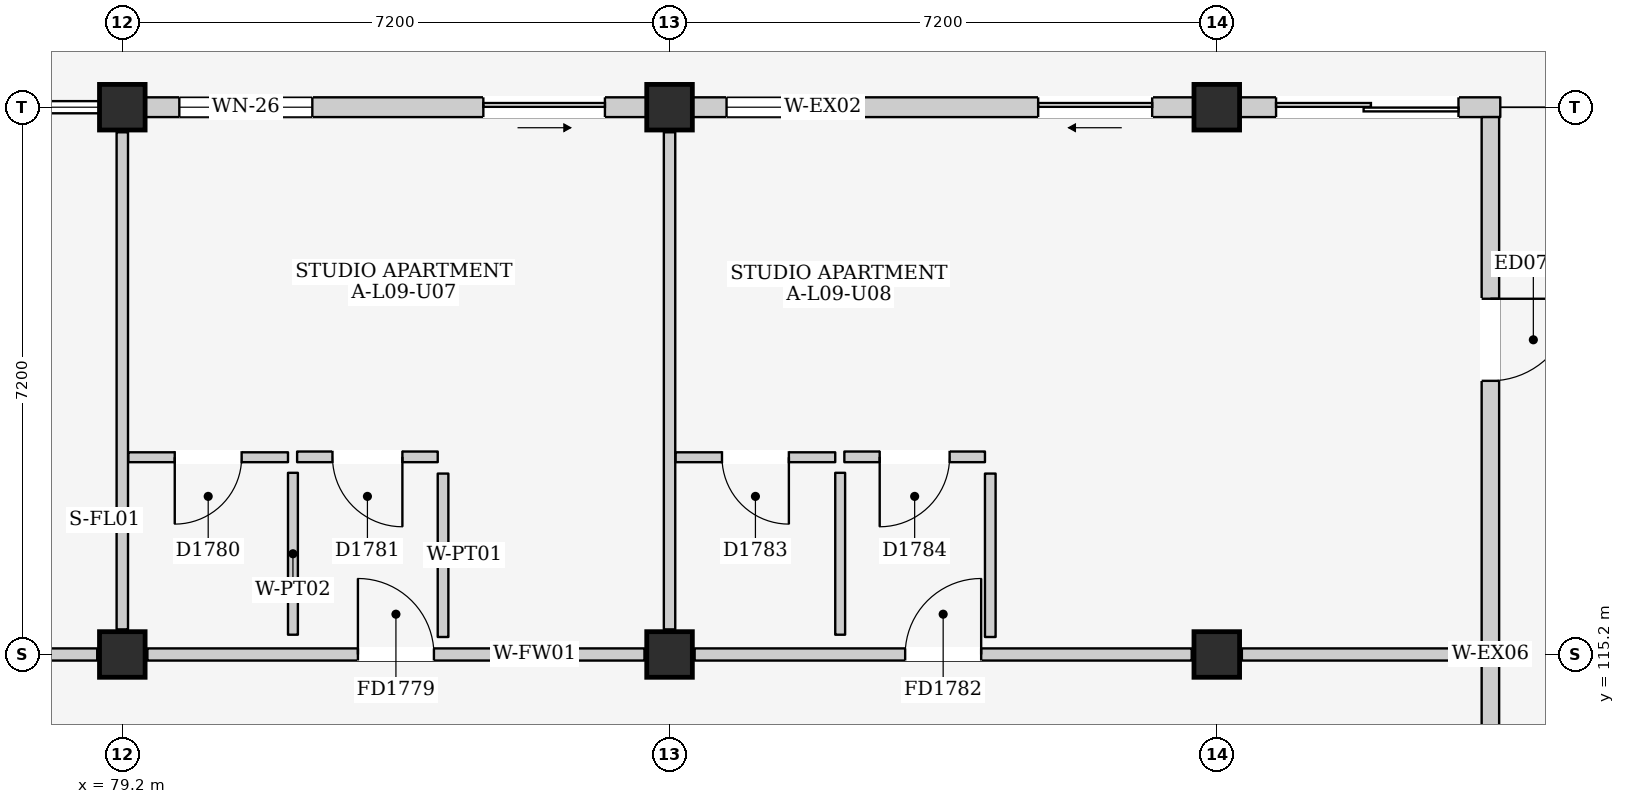
"""IFC4 building model, lengths in metres.
Left out: names, types, materials, properties, quantities, classifications, styles, units other than length and angle.
Written with IfcOpenShell. Run it as: python <this file> out.ifc"""

import sys

from ifc_helpers import new_model, si_unit, direction, frame, frame_2d, origin, origin_2d, place, context, subcontext, project, spatial, rectangle, extrude, element, fill, save


model = new_model("IFC4")
c1 = context("Model", 3, precision=1e-05, world=origin(), true_north=direction((0.0, 1.0)))
c2 = subcontext(c1, "Body", "Model", "MODEL_VIEW")
j1 = project(units=[si_unit("LENGTHUNIT", "METRE"), si_unit("PLANEANGLEUNIT", "RADIAN")], contexts=[c1])
p1 = place(None, origin())
s1 = spatial("IfcSite", under=j1, at=p1, CompositionType="ELEMENT")
p2 = place(p1, origin())
s2 = spatial("IfcBuilding", under=s1, at=p2, CompositionType="ELEMENT")
p3 = place(p2, frame((0.0, 0.0, 31.5)))
s3 = spatial("IfcBuildingStorey", under=s2, at=p3, CompositionType="ELEMENT", Elevation=31.5)
for number, where, z_axis, x_axis in (
    (1, (79.2, 115.2, 0.0), (0.0, 0.0, 1.0), (1.0, 0.0, 0.0)),
    (2, (79.2, 122.4, 0.0), (0.0, 0.0, 1.0), (1.0, 0.0, 0.0)),
    (3, (86.4, 115.2, 0.0), (0.0, 0.0, 1.0), (1.0, 0.0, 0.0)),
    (4, (86.4, 122.4, 0.0), (0.0, 0.0, 1.0), (1.0, 0.0, 0.0)),
    (5, (93.6, 115.2, 0.0), (0.0, 0.0, 1.0), (1.0, 0.0, 0.0)),
    (6, (93.6, 122.4, 0.0), (0.0, 0.0, 1.0), (1.0, 0.0, 0.0)),
):
    element("IfcColumn", number, at=place(p3, frame(where, z_axis=z_axis, x_axis=x_axis)), inside=s3, PredefinedType="COLUMN", context=c2, shape_type="SweptSolid", body=[
        extrude(rectangle(XDim=0.6, YDim=0.6, at=origin_2d()), origin(), (0.0, 0.0, 1.0), 3.3),
    ])
p4 = place(p3, frame((79.5, 122.4, 0.0), z_axis=(0.0, 0.0, 1.0), x_axis=(1.0, 0.0, 0.0)))
e7 = element("IfcWall", 7, at=p4, inside=s3, PredefinedType="ELEMENTEDWALL", context=c2, shape_type="SweptSolid", body=[
    extrude(rectangle(XDim=6.6, YDim=0.26, at=frame_2d((3.3, 0.0))), origin(), (0.0, 0.0, 1.0), 2.615),
])
p5 = place(p4, frame((4.45, 0.0, 0.0)))
e8 = element("IfcOpeningElement", 8, at=p5, cuts=e7, PredefinedType="OPENING", context=c2, shape_type="SweptSolid", body=[
    extrude(rectangle(XDim=1.6, YDim=2.12, at=frame_2d((0.8, 1.06))), frame((0.0, 0.145, 0.0), z_axis=(0.0, -1.0, 0.0), x_axis=(1.0, 0.0, 0.0)), (0.0, 0.0, 1.0), 0.29),
])
p6 = place(p4, frame((0.45, 0.0, 0.9)))
e9 = element("IfcOpeningElement", 9, at=p6, cuts=e7, PredefinedType="OPENING", context=c2, shape_type="SweptSolid", body=[
    extrude(rectangle(XDim=1.75, YDim=1.55, at=frame_2d((0.875, 0.775))), frame((0.0, 0.145, 0.0), z_axis=(0.0, -1.0, 0.0), x_axis=(1.0, 0.0, 0.0)), (0.0, 0.0, 1.0), 0.29),
])
p7 = place(p3, frame((86.7, 122.4, 0.0), z_axis=(0.0, 0.0, 1.0), x_axis=(1.0, 0.0, 0.0)))
e10 = element("IfcWall", 10, at=p7, inside=s3, PredefinedType="ELEMENTEDWALL", context=c2, shape_type="SweptSolid", body=[
    extrude(rectangle(XDim=6.6, YDim=0.26, at=frame_2d((3.3, 0.0))), origin(), (0.0, 0.0, 1.0), 2.615),
])
p8 = place(p7, frame((4.55, 0.0, 0.0)))
e11 = element("IfcOpeningElement", 11, at=p8, cuts=e10, PredefinedType="OPENING", context=c2, shape_type="SweptSolid", body=[
    extrude(rectangle(XDim=1.5, YDim=2.12, at=frame_2d((0.75, 1.06))), frame((0.0, 0.145, 0.0), z_axis=(0.0, -1.0, 0.0), x_axis=(1.0, 0.0, 0.0)), (0.0, 0.0, 1.0), 0.29),
])
p9 = place(p7, frame((0.45, 0.0, 0.9)))
e12 = element("IfcOpeningElement", 12, at=p9, cuts=e10, PredefinedType="OPENING", context=c2, shape_type="SweptSolid", body=[
    extrude(rectangle(XDim=1.8, YDim=1.5, at=frame_2d((0.9, 0.75))), frame((0.0, 0.145, 0.0), z_axis=(0.0, -1.0, 0.0), x_axis=(1.0, 0.0, 0.0)), (0.0, 0.0, 1.0), 0.29),
])
p10 = place(p3, frame((93.9, 122.4, 0.0), z_axis=(0.0, 0.0, 1.0), x_axis=(1.0, 0.0, 0.0)))
e13 = element("IfcWall", 13, at=p10, inside=s3, PredefinedType="ELEMENTEDWALL", context=c2, shape_type="SweptSolid", body=[
    extrude(rectangle(XDim=3.43, YDim=0.26, at=frame_2d((1.715, 0.0))), origin(), (0.0, 0.0, 1.0), 2.415),
])
p11 = place(p10, frame((0.48, 0.0, 0.0)))
e14 = element("IfcOpeningElement", 14, at=p11, cuts=e13, PredefinedType="OPENING", context=c2, shape_type="SweptSolid", body=[
    extrude(rectangle(XDim=2.4, YDim=2.12, at=frame_2d((1.2, 1.06))), frame((0.0, 0.145, 0.0), z_axis=(0.0, -1.0, 0.0), x_axis=(1.0, 0.0, 0.0)), (0.0, 0.0, 1.0), 0.29),
])
p12 = place(p3, frame((97.2, 108.13, 0.0), z_axis=(0.0, 0.0, 1.0), x_axis=(0.0, 1.0, 0.0)))
e15 = element("IfcWall", 15, at=p12, inside=s3, PredefinedType="ELEMENTEDWALL", context=c2, shape_type="SweptSolid", body=[
    extrude(rectangle(XDim=7.07, YDim=0.23, at=frame_2d((3.535, 0.0))), origin(), (0.0, 0.0, 1.0), 2.515),
])
p13 = place(p12, frame((2.75, 0.0, 1.1)))
e16 = element("IfcOpeningElement", 16, at=p13, cuts=e15, PredefinedType="OPENING", context=c2, shape_type="SweptSolid", body=[
    extrude(rectangle(XDim=1.0, YDim=0.9, at=frame_2d((0.5, 0.45))), frame((0.0, 0.13, 0.0), z_axis=(0.0, -1.0, 0.0), x_axis=(1.0, 0.0, 0.0)), (0.0, 0.0, 1.0), 0.26),
])
p14 = place(p3, frame((97.2, 115.2, 0.0), z_axis=(0.0, 0.0, 1.0), x_axis=(0.0, 1.0, 0.0)))
e17 = element("IfcWall", 17, at=p14, inside=s3, PredefinedType="ELEMENTEDWALL", context=c2, shape_type="SweptSolid", body=[
    extrude(rectangle(XDim=7.07, YDim=0.23, at=frame_2d((3.535, 0.0))), origin(), (0.0, 0.0, 1.0), 2.515),
])
p15 = place(p14, frame((3.6, 0.0, 0.0)))
e18 = element("IfcOpeningElement", 18, at=p15, cuts=e17, PredefinedType="OPENING", context=c2, shape_type="SweptSolid", body=[
    extrude(rectangle(XDim=1.08, YDim=2.12, at=frame_2d((0.54, 1.06))), frame((0.0, 0.13, 0.0), z_axis=(0.0, -1.0, 0.0), x_axis=(1.0, 0.0, 0.0)), (0.0, 0.0, 1.0), 0.26),
])
p16 = place(p3, frame((72.33, 115.2, 0.0), z_axis=(0.0, 0.0, 1.0), x_axis=(1.0, 0.0, 0.0)))
e19 = element("IfcWall", 19, at=p16, inside=s3, PredefinedType="PARTITIONING", context=c2, shape_type="SweptSolid", body=[
    extrude(rectangle(XDim=6.54, YDim=0.16, at=frame_2d((3.27, 0.0))), origin(), (0.0, 0.0, 1.0), 2.415),
])
p17 = place(p16, frame((2.77, 0.0, 0.0)))
e20 = element("IfcOpeningElement", 20, at=p17, cuts=e19, PredefinedType="OPENING", context=c2, shape_type="SweptSolid", body=[
    extrude(rectangle(XDim=1.0, YDim=2.15, at=frame_2d((0.5, 1.075))), frame((0.0, 0.095, 0.0), z_axis=(0.0, -1.0, 0.0), x_axis=(1.0, 0.0, 0.0)), (0.0, 0.0, 1.0), 0.19),
])
p18 = place(p3, frame((79.2, 115.53, 0.0), z_axis=(0.0, 0.0, 1.0), x_axis=(0.0, 1.0, 0.0)))
e21 = element("IfcWall", 21, at=p18, inside=s3, PredefinedType="PARTITIONING", context=c2, shape_type="SweptSolid", body=[
    extrude(rectangle(XDim=6.54, YDim=0.15, at=frame_2d((3.27, 0.0))), origin(), (0.0, 0.0, 1.0), 2.565),
])
p19 = place(p3, frame((79.53, 115.2, 0.0), z_axis=(0.0, 0.0, 1.0), x_axis=(1.0, 0.0, 0.0)))
e22 = element("IfcWall", 22, at=p19, inside=s3, PredefinedType="PARTITIONING", context=c2, shape_type="SweptSolid", body=[
    extrude(rectangle(XDim=6.54, YDim=0.16, at=frame_2d((3.27, 0.0))), origin(), (0.0, 0.0, 1.0), 2.415),
])
p20 = place(p19, frame((2.77, 0.0, 0.0)))
e23 = element("IfcOpeningElement", 23, at=p20, cuts=e22, PredefinedType="OPENING", context=c2, shape_type="SweptSolid", body=[
    extrude(rectangle(XDim=1.0, YDim=2.15, at=frame_2d((0.5, 1.075))), frame((0.0, 0.095, 0.0), z_axis=(0.0, -1.0, 0.0), x_axis=(1.0, 0.0, 0.0)), (0.0, 0.0, 1.0), 0.19),
])
p21 = place(p3, frame((86.4, 115.53, 0.0), z_axis=(0.0, 0.0, 1.0), x_axis=(0.0, 1.0, 0.0)))
e24 = element("IfcWall", 24, at=p21, inside=s3, PredefinedType="PARTITIONING", context=c2, shape_type="SweptSolid", body=[
    extrude(rectangle(XDim=6.54, YDim=0.15, at=frame_2d((3.27, 0.0))), origin(), (0.0, 0.0, 1.0), 2.565),
])
p22 = place(p3, frame((79.28, 117.795, 0.0), z_axis=(0.0, 0.0, 1.0), x_axis=(1.0, 0.0, 0.0)))
e25 = element("IfcWall", 25, at=p22, inside=s3, PredefinedType="PARTITIONING", context=c2, shape_type="SweptSolid", body=[
    extrude(rectangle(XDim=2.1, YDim=0.13, at=frame_2d((1.05, 0.0))), origin(), (0.0, 0.0, 1.0), 3.08),
])
p23 = place(p22, frame((0.61, 0.0, 0.0)))
e26 = element("IfcOpeningElement", 26, at=p23, cuts=e25, PredefinedType="OPENING", context=c2, shape_type="SweptSolid", body=[
    extrude(rectangle(XDim=0.88, YDim=2.1, at=frame_2d((0.44, 1.05))), frame((0.0, 0.08, 0.0), z_axis=(0.0, -1.0, 0.0), x_axis=(1.0, 0.0, 0.0)), (0.0, 0.0, 1.0), 0.16),
])
p24 = place(p3, frame((81.445, 115.46, 0.0), z_axis=(0.0, 0.0, 1.0), x_axis=(0.0, 1.0, 0.0)))
e27 = element("IfcWall", 27, at=p24, inside=s3, PredefinedType="PARTITIONING", context=c2, shape_type="SweptSolid", body=[
    extrude(rectangle(XDim=2.13, YDim=0.13, at=frame_2d((1.065, 0.0))), origin(), (0.0, 0.0, 1.0), 3.08),
])
p25 = place(p3, frame((81.5, 117.8, 0.0), z_axis=(0.0, 0.0, 1.0), x_axis=(1.0, 0.0, 0.0)))
e28 = element("IfcWall", 28, at=p25, inside=s3, PredefinedType="PARTITIONING", context=c2, shape_type="SweptSolid", body=[
    extrude(rectangle(XDim=1.85, YDim=0.14, at=frame_2d((0.925, 0.0))), origin(), (0.0, 0.0, 1.0), 3.08),
])
p26 = place(p25, frame((0.465, 0.0, 0.0)))
e29 = element("IfcOpeningElement", 29, at=p26, cuts=e28, PredefinedType="OPENING", context=c2, shape_type="SweptSolid", body=[
    extrude(rectangle(XDim=0.92, YDim=2.1, at=frame_2d((0.46, 1.05))), frame((0.0, 0.085, 0.0), z_axis=(0.0, -1.0, 0.0), x_axis=(1.0, 0.0, 0.0)), (0.0, 0.0, 1.0), 0.17),
])
p27 = place(p3, frame((83.42, 115.43, 0.0), z_axis=(0.0, 0.0, 1.0), x_axis=(0.0, 1.0, 0.0)))
e30 = element("IfcWall", 30, at=p27, inside=s3, PredefinedType="PARTITIONING", context=c2, shape_type="SweptSolid", body=[
    extrude(rectangle(XDim=2.15, YDim=0.14, at=frame_2d((1.075, 0.0))), origin(), (0.0, 0.0, 1.0), 3.08),
])
p28 = place(p3, frame((86.73, 115.2, 0.0), z_axis=(0.0, 0.0, 1.0), x_axis=(1.0, 0.0, 0.0)))
e31 = element("IfcWall", 31, at=p28, inside=s3, PredefinedType="PARTITIONING", context=c2, shape_type="SweptSolid", body=[
    extrude(rectangle(XDim=6.54, YDim=0.16, at=frame_2d((3.27, 0.0))), origin(), (0.0, 0.0, 1.0), 2.415),
])
p29 = place(p28, frame((2.77, 0.0, 0.0)))
e32 = element("IfcOpeningElement", 32, at=p29, cuts=e31, PredefinedType="OPENING", context=c2, shape_type="SweptSolid", body=[
    extrude(rectangle(XDim=1.0, YDim=2.15, at=frame_2d((0.5, 1.075))), frame((0.0, 0.095, 0.0), z_axis=(0.0, -1.0, 0.0), x_axis=(1.0, 0.0, 0.0)), (0.0, 0.0, 1.0), 0.19),
])
p30 = place(p3, frame((93.93, 115.2, 0.0), z_axis=(0.0, 0.0, 1.0), x_axis=(1.0, 0.0, 0.0)))
e33 = element("IfcWall", 33, at=p30, inside=s3, PredefinedType="PARTITIONING", context=c2, shape_type="SweptSolid", body=[
    extrude(rectangle(XDim=2.99, YDim=0.16, at=frame_2d((1.495, 0.0))), origin(), (0.0, 0.0, 1.0), 2.415),
])
p31 = place(p3, frame((86.48, 117.795, 0.0), z_axis=(0.0, 0.0, 1.0), x_axis=(1.0, 0.0, 0.0)))
e34 = element("IfcWall", 34, at=p31, inside=s3, PredefinedType="PARTITIONING", context=c2, shape_type="SweptSolid", body=[
    extrude(rectangle(XDim=2.1, YDim=0.13, at=frame_2d((1.05, 0.0))), origin(), (0.0, 0.0, 1.0), 3.08),
])
p32 = place(p31, frame((0.61, 0.0, 0.0)))
e35 = element("IfcOpeningElement", 35, at=p32, cuts=e34, PredefinedType="OPENING", context=c2, shape_type="SweptSolid", body=[
    extrude(rectangle(XDim=0.88, YDim=2.1, at=frame_2d((0.44, 1.05))), frame((0.0, 0.08, 0.0), z_axis=(0.0, -1.0, 0.0), x_axis=(1.0, 0.0, 0.0)), (0.0, 0.0, 1.0), 0.16),
])
p33 = place(p3, frame((88.645, 115.46, 0.0), z_axis=(0.0, 0.0, 1.0), x_axis=(0.0, 1.0, 0.0)))
e36 = element("IfcWall", 36, at=p33, inside=s3, PredefinedType="PARTITIONING", context=c2, shape_type="SweptSolid", body=[
    extrude(rectangle(XDim=2.13, YDim=0.13, at=frame_2d((1.065, 0.0))), origin(), (0.0, 0.0, 1.0), 3.08),
])
p34 = place(p3, frame((88.7, 117.8, 0.0), z_axis=(0.0, 0.0, 1.0), x_axis=(1.0, 0.0, 0.0)))
e37 = element("IfcWall", 37, at=p34, inside=s3, PredefinedType="PARTITIONING", context=c2, shape_type="SweptSolid", body=[
    extrude(rectangle(XDim=1.85, YDim=0.14, at=frame_2d((0.925, 0.0))), origin(), (0.0, 0.0, 1.0), 3.08),
])
p35 = place(p34, frame((0.465, 0.0, 0.0)))
e38 = element("IfcOpeningElement", 38, at=p35, cuts=e37, PredefinedType="OPENING", context=c2, shape_type="SweptSolid", body=[
    extrude(rectangle(XDim=0.92, YDim=2.1, at=frame_2d((0.46, 1.05))), frame((0.0, 0.085, 0.0), z_axis=(0.0, -1.0, 0.0), x_axis=(1.0, 0.0, 0.0)), (0.0, 0.0, 1.0), 0.17),
])
p36 = place(p3, frame((90.62, 115.43, 0.0), z_axis=(0.0, 0.0, 1.0), x_axis=(0.0, 1.0, 0.0)))
e39 = element("IfcWall", 39, at=p36, inside=s3, PredefinedType="PARTITIONING", context=c2, shape_type="SweptSolid", body=[
    extrude(rectangle(XDim=2.15, YDim=0.14, at=frame_2d((1.075, 0.0))), origin(), (0.0, 0.0, 1.0), 3.08),
])
p37 = place(p5, frame((1.6, 0.0, 0.0), z_axis=(0.0, 0.0, 1.0), x_axis=(-1.0, 0.0, 0.0)))
e40 = element("IfcDoor", 40, at=p37, inside=s3, OperationType="SLIDING_TO_RIGHT", PredefinedType="DOOR", context=c2, shape_type="SweptSolid", body=[
    extrude(rectangle(XDim=1.6, YDim=2.12, at=frame_2d((0.8, 1.06))), frame((0.0, 0.025, 0.0), z_axis=(0.0, -1.0, 0.0), x_axis=(1.0, 0.0, 0.0)), (0.0, 0.0, 1.0), 0.05),
])
fill(e8, e40)
p38 = place(p6, origin())
e41 = element("IfcWindow", 41, at=p38, inside=s3, PartitioningType="DOUBLE_PANEL_VERTICAL", PredefinedType="WINDOW", context=c2, shape_type="SweptSolid", body=[
    extrude(rectangle(XDim=1.75, YDim=1.55, at=frame_2d((0.875, 0.775))), frame((0.0, 0.03, 0.0), z_axis=(0.0, -1.0, 0.0), x_axis=(1.0, 0.0, 0.0)), (0.0, 0.0, 1.0), 0.06),
])
fill(e9, e41)
p39 = place(p8, frame((1.5, 0.0, 0.0), z_axis=(0.0, 0.0, 1.0), x_axis=(-1.0, 0.0, 0.0)))
e42 = element("IfcDoor", 42, at=p39, inside=s3, OperationType="SLIDING_TO_LEFT", PredefinedType="DOOR", context=c2, shape_type="SweptSolid", body=[
    extrude(rectangle(XDim=1.5, YDim=2.12, at=frame_2d((0.75, 1.06))), frame((0.0, 0.025, 0.0), z_axis=(0.0, -1.0, 0.0), x_axis=(1.0, 0.0, 0.0)), (0.0, 0.0, 1.0), 0.05),
])
fill(e11, e42)
p40 = place(p9, origin())
e43 = element("IfcWindow", 43, at=p40, inside=s3, PartitioningType="DOUBLE_PANEL_VERTICAL", PredefinedType="WINDOW", context=c2, shape_type="SweptSolid", body=[
    extrude(rectangle(XDim=1.8, YDim=1.5, at=frame_2d((0.9, 0.75))), frame((0.0, 0.03, 0.0), z_axis=(0.0, -1.0, 0.0), x_axis=(1.0, 0.0, 0.0)), (0.0, 0.0, 1.0), 0.06),
])
fill(e12, e43)
p41 = place(p11, frame((2.4, 0.0, 0.0), z_axis=(0.0, 0.0, 1.0), x_axis=(-1.0, 0.0, 0.0)))
e44 = element("IfcDoor", 44, at=p41, inside=s3, OperationType="DOUBLE_DOOR_SLIDING", PredefinedType="DOOR", context=c2, shape_type="SweptSolid", body=[
    extrude(rectangle(XDim=2.4, YDim=2.12, at=frame_2d((1.2, 1.06))), frame((0.0, 0.025, 0.0), z_axis=(0.0, -1.0, 0.0), x_axis=(1.0, 0.0, 0.0)), (0.0, 0.0, 1.0), 0.05),
])
fill(e14, e44)
p42 = place(p15, frame((1.08, 0.0, 0.0), z_axis=(0.0, 0.0, 1.0), x_axis=(-1.0, 0.0, 0.0)))
e45 = element("IfcDoor", 45, at=p42, inside=s3, OperationType="SINGLE_SWING_LEFT", PredefinedType="DOOR", context=c2, shape_type="SweptSolid", body=[
    extrude(rectangle(XDim=1.08, YDim=2.12, at=frame_2d((0.54, 1.06))), frame((0.0, 0.025, 0.0), z_axis=(0.0, -1.0, 0.0), x_axis=(1.0, 0.0, 0.0)), (0.0, 0.0, 1.0), 0.05),
])
fill(e18, e45)
p43 = place(p20, origin())
e46 = element("IfcDoor", 46, at=p43, inside=s3, OperationType="SINGLE_SWING_LEFT", PredefinedType="DOOR", context=c2, shape_type="SweptSolid", body=[
    extrude(rectangle(XDim=1.0, YDim=2.15, at=frame_2d((0.5, 1.075))), frame((0.0, 0.025, 0.0), z_axis=(0.0, -1.0, 0.0), x_axis=(1.0, 0.0, 0.0)), (0.0, 0.0, 1.0), 0.05),
])
fill(e23, e46)
p44 = place(p23, frame((0.88, 0.0, 0.0), z_axis=(0.0, 0.0, 1.0), x_axis=(-1.0, 0.0, 0.0)))
e47 = element("IfcDoor", 47, at=p44, inside=s3, OperationType="SINGLE_SWING_RIGHT", PredefinedType="DOOR", context=c2, shape_type="SweptSolid", body=[
    extrude(rectangle(XDim=0.88, YDim=2.1, at=frame_2d((0.44, 1.05))), frame((0.0, 0.025, 0.0), z_axis=(0.0, -1.0, 0.0), x_axis=(1.0, 0.0, 0.0)), (0.0, 0.0, 1.0), 0.05),
])
fill(e26, e47)
p45 = place(p26, frame((0.92, 0.0, 0.0), z_axis=(0.0, 0.0, 1.0), x_axis=(-1.0, 0.0, 0.0)))
e48 = element("IfcDoor", 48, at=p45, inside=s3, OperationType="SINGLE_SWING_LEFT", PredefinedType="DOOR", context=c2, shape_type="SweptSolid", body=[
    extrude(rectangle(XDim=0.92, YDim=2.1, at=frame_2d((0.46, 1.05))), frame((0.0, 0.025, 0.0), z_axis=(0.0, -1.0, 0.0), x_axis=(1.0, 0.0, 0.0)), (0.0, 0.0, 1.0), 0.05),
])
fill(e29, e48)
p46 = place(p29, origin())
e49 = element("IfcDoor", 49, at=p46, inside=s3, OperationType="SINGLE_SWING_RIGHT", PredefinedType="DOOR", context=c2, shape_type="SweptSolid", body=[
    extrude(rectangle(XDim=1.0, YDim=2.15, at=frame_2d((0.5, 1.075))), frame((0.0, 0.025, 0.0), z_axis=(0.0, -1.0, 0.0), x_axis=(1.0, 0.0, 0.0)), (0.0, 0.0, 1.0), 0.05),
])
fill(e32, e49)
p47 = place(p32, frame((0.88, 0.0, 0.0), z_axis=(0.0, 0.0, 1.0), x_axis=(-1.0, 0.0, 0.0)))
e50 = element("IfcDoor", 50, at=p47, inside=s3, OperationType="SINGLE_SWING_LEFT", PredefinedType="DOOR", context=c2, shape_type="SweptSolid", body=[
    extrude(rectangle(XDim=0.88, YDim=2.1, at=frame_2d((0.44, 1.05))), frame((0.0, 0.025, 0.0), z_axis=(0.0, -1.0, 0.0), x_axis=(1.0, 0.0, 0.0)), (0.0, 0.0, 1.0), 0.05),
])
fill(e35, e50)
p48 = place(p35, frame((0.92, 0.0, 0.0), z_axis=(0.0, 0.0, 1.0), x_axis=(-1.0, 0.0, 0.0)))
e51 = element("IfcDoor", 51, at=p48, inside=s3, OperationType="SINGLE_SWING_RIGHT", PredefinedType="DOOR", context=c2, shape_type="SweptSolid", body=[
    extrude(rectangle(XDim=0.92, YDim=2.1, at=frame_2d((0.46, 1.05))), frame((0.0, 0.025, 0.0), z_axis=(0.0, -1.0, 0.0), x_axis=(1.0, 0.0, 0.0)), (0.0, 0.0, 1.0), 0.05),
])
fill(e38, e51)
save(model, sys.argv[1])
